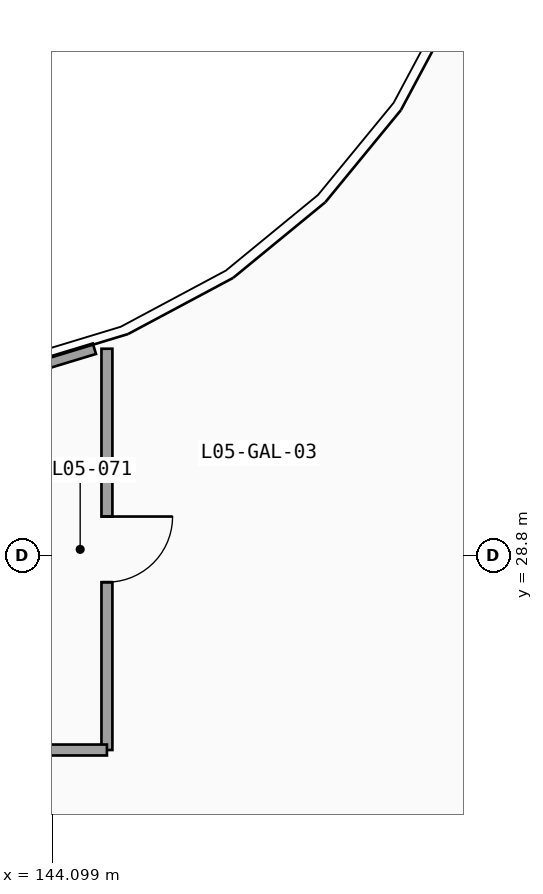
"""IFC4 building model, lengths in metres.
Left out: names, types, materials, properties, quantities, classifications, styles, units other than length and angle.
Written with IfcOpenShell. Run it as: python <this file> out.ifc"""

import sys

from ifc_helpers import new_model, si_unit, direction, frame, frame_2d, origin, place, context, subcontext, project, spatial, rectangle, extrude, element, fill, save


model = new_model("IFC4")
c1 = context("Model", 3, precision=1e-05, world=origin(), true_north=direction((0.0, 1.0)))
c2 = subcontext(c1, "Body", "Model", "MODEL_VIEW")
j1 = project(units=[si_unit("LENGTHUNIT", "METRE"), si_unit("PLANEANGLEUNIT", "RADIAN")], contexts=[c1])
p1 = place(None, origin())
s1 = spatial("IfcSite", under=j1, at=p1, CompositionType="ELEMENT")
p2 = place(p1, origin())
s2 = spatial("IfcBuilding", under=s1, at=p2, CompositionType="ELEMENT")
p3 = place(p2, frame((0.0, 0.0, 23.1)))
s3 = spatial("IfcBuildingStorey", under=s2, at=p3, CompositionType="ELEMENT", Elevation=23.1)
p4 = place(p3, frame((143.415, 31.781, 0.0), z_axis=(0.0, 0.0, 1.0), x_axis=(0.956921766266, 0.290345885534, 0.0)))
e1 = element("IfcWall", 1, at=p4, inside=s3, PredefinedType="PARTITIONING", context=c2, shape_type="SweptSolid", body=[
    extrude(rectangle(XDim=1.441, YDim=0.18, at=frame_2d((0.721, 0.0))), origin(), (0.0, 0.0, 1.0), 4.82),
])
p5 = place(p3, frame((145.0, 32.2, 0.0), z_axis=(0.0, 0.0, 1.0), x_axis=(0.0, -1.0, 0.0)))
e2 = element("IfcWall", 2, at=p5, inside=s3, PredefinedType="PARTITIONING", context=c2, shape_type="SweptSolid", body=[
    extrude(rectangle(XDim=6.6, YDim=0.18, at=frame_2d((3.3, 0.0))), origin(), (0.0, 0.0, 1.0), 4.82),
])
p6 = place(p5, frame((2.76, 0.0, 0.0), z_axis=(0.0, 0.0, 1.0), x_axis=(1.0, 0.0, 0.0)))
e3 = element("IfcOpeningElement", 3, at=p6, cuts=e2, PredefinedType="OPENING", context=c2, shape_type="SweptSolid", body=[
    extrude(rectangle(XDim=1.08, YDim=2.22, at=frame_2d((0.54, 1.11))), frame((0.0, 0.1, 0.0), z_axis=(0.0, -1.0, 0.0), x_axis=(1.0, 0.0, 0.0)), (0.0, 0.0, 1.0), 0.2),
])
p7 = place(p3, frame((145.0, 25.6, 0.0), z_axis=(0.0, 0.0, 1.0), x_axis=(-1.0, 0.0, 0.0)))
e4 = element("IfcWall", 4, at=p7, inside=s3, PredefinedType="PARTITIONING", context=c2, shape_type="SweptSolid", body=[
    extrude(rectangle(XDim=4.62, YDim=0.18, at=frame_2d((2.31, 0.0))), origin(), (0.0, 0.0, 1.0), 4.82),
])
p8 = place(p6, origin())
e5 = element("IfcDoor", 5, at=p8, inside=s3, OperationType="SINGLE_SWING_LEFT", PredefinedType="DOOR", context=c2, shape_type="SweptSolid", body=[
    extrude(rectangle(XDim=1.08, YDim=2.22, at=frame_2d((0.54, 1.11))), frame((0.0, 0.025, 0.0), z_axis=(0.0, -1.0, 0.0), x_axis=(1.0, 0.0, 0.0)), (0.0, 0.0, 1.0), 0.05),
])
fill(e3, e5)
save(model, sys.argv[1])
